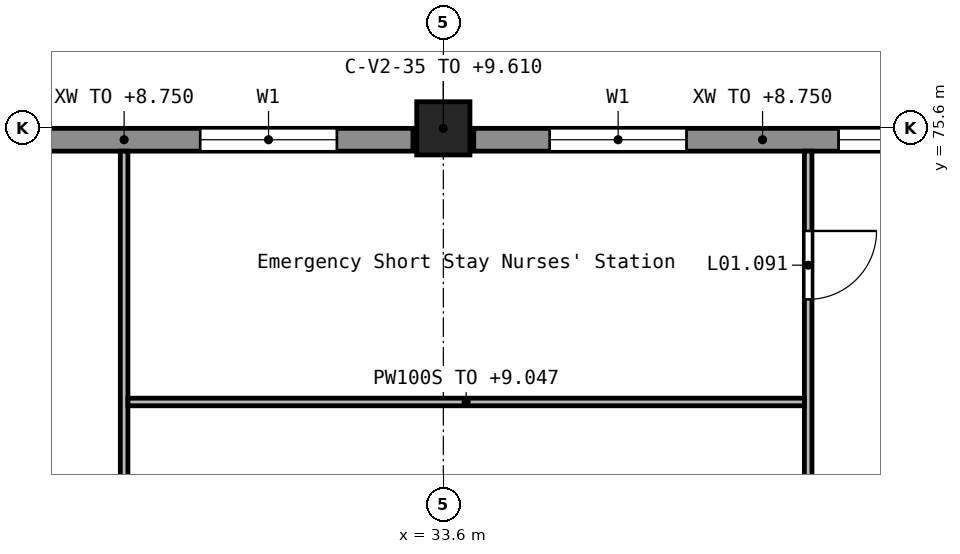
"""IFC4 building model, lengths in metres.
Left out: names, types, materials, properties, quantities, classifications, styles, units other than length and angle.
Written with IfcOpenShell. Run it as: python <this file> out.ifc"""

import sys

from ifc_helpers import new_model, si_unit, direction, frame, frame_2d, origin, origin_2d, place, context, subcontext, project, spatial, rectangle, extrude, element, fill, save


model = new_model("IFC4")
c1 = context("Model", 3, precision=1e-05, world=origin(), true_north=direction((0.0, 1.0)))
c2 = subcontext(c1, "Body", "Model", "MODEL_VIEW")
j1 = project(units=[si_unit("LENGTHUNIT", "METRE"), si_unit("PLANEANGLEUNIT", "RADIAN")], contexts=[c1])
p1 = place(None, origin())
s1 = spatial("IfcSite", under=j1, at=p1, CompositionType="ELEMENT")
p2 = place(p1, origin())
s2 = spatial("IfcBuilding", under=s1, at=p2, CompositionType="ELEMENT")
p3 = place(p2, frame((0.0, 0.0, 5.4)))
s3 = spatial("IfcBuildingStorey", under=s2, at=p3, CompositionType="ELEMENT", Elevation=5.4)
p4 = place(p3, frame((33.6, 75.6, 0.0), z_axis=(0.0, 0.0, 1.0), x_axis=(1.0, 0.0, 0.0)))
e1 = element("IfcColumn", 1, at=p4, inside=s3, PredefinedType="COLUMN", context=c2, shape_type="SweptSolid", body=[
    extrude(rectangle(XDim=0.7, YDim=0.7, at=origin_2d()), origin(), (0.0, 0.0, 1.0), 4.21),
])
p5 = place(p3, frame((41.6, 75.45, 0.0), z_axis=(0.0, 0.0, 1.0), x_axis=(-1.0, 0.0, 0.0)))
e2 = element("IfcWall", 2, at=p5, inside=s3, PredefinedType="STANDARD", context=c2, shape_type="SweptSolid", body=[
    extrude(rectangle(XDim=7.6, YDim=0.3, at=frame_2d((3.8, 0.0))), origin(), (0.0, 0.0, 1.0), 3.35),
])
p6 = place(p5, frame((1.0, 0.0, 0.9)))
e3 = element("IfcOpeningElement", 3, at=p6, cuts=e2, PredefinedType="OPENING", context=c2, shape_type="SweptSolid", body=[
    extrude(rectangle(XDim=1.8, YDim=1.5, at=frame_2d((0.9, 0.75))), frame((0.0, 0.16, 0.0), z_axis=(0.0, -1.0, 0.0), x_axis=(1.0, 0.0, 0.0)), (0.0, 0.0, 1.0), 0.32),
])
p7 = place(p5, frame((4.8, 0.0, 0.9)))
e4 = element("IfcOpeningElement", 4, at=p7, cuts=e2, PredefinedType="OPENING", context=c2, shape_type="SweptSolid", body=[
    extrude(rectangle(XDim=1.8, YDim=1.5, at=frame_2d((0.9, 0.75))), frame((0.0, 0.16, 0.0), z_axis=(0.0, -1.0, 0.0), x_axis=(1.0, 0.0, 0.0)), (0.0, 0.0, 1.0), 0.32),
])
p8 = place(p3, frame((33.2, 75.45, 0.0), z_axis=(0.0, 0.0, 1.0), x_axis=(-1.0, 0.0, 0.0)))
e5 = element("IfcWall", 5, at=p8, inside=s3, PredefinedType="STANDARD", context=c2, shape_type="SweptSolid", body=[
    extrude(rectangle(XDim=7.6, YDim=0.3, at=frame_2d((3.8, 0.0))), origin(), (0.0, 0.0, 1.0), 3.35),
])
p9 = place(p8, frame((1.0, 0.0, 0.9)))
e6 = element("IfcOpeningElement", 6, at=p9, cuts=e5, PredefinedType="OPENING", context=c2, shape_type="SweptSolid", body=[
    extrude(rectangle(XDim=1.8, YDim=1.5, at=frame_2d((0.9, 0.75))), frame((0.0, 0.16, 0.0), z_axis=(0.0, -1.0, 0.0), x_axis=(1.0, 0.0, 0.0)), (0.0, 0.0, 1.0), 0.32),
])
p10 = place(p8, frame((4.8, 0.0, 0.9)))
e7 = element("IfcOpeningElement", 7, at=p10, cuts=e5, PredefinedType="OPENING", context=c2, shape_type="SweptSolid", body=[
    extrude(rectangle(XDim=1.8, YDim=1.5, at=frame_2d((0.9, 0.75))), frame((0.0, 0.16, 0.0), z_axis=(0.0, -1.0, 0.0), x_axis=(1.0, 0.0, 0.0)), (0.0, 0.0, 1.0), 0.32),
])
p11 = place(p3, frame((38.4, 75.3, 0.0), z_axis=(0.0, 0.0, 1.0), x_axis=(0.0, -1.0, 0.0)))
e8 = element("IfcWall", 8, at=p11, inside=s3, PredefinedType="PARTITIONING", context=c2, shape_type="SweptSolid", body=[
    extrude(rectangle(XDim=10.325, YDim=0.1, at=frame_2d((5.163, 0.0))), origin(), (0.0, 0.0, 1.0), 4.15),
])
p12 = place(p11, frame((8.6, 0.0, 0.0)))
e9 = element("IfcOpeningElement", 9, at=p12, cuts=e8, PredefinedType="OPENING", context=c2, shape_type="SweptSolid", body=[
    extrude(rectangle(XDim=1.4, YDim=2.1, at=frame_2d((0.7, 1.05))), frame((0.0, 0.06, 0.0), z_axis=(0.0, -1.0, 0.0), x_axis=(1.0, 0.0, 0.0)), (0.0, 0.0, 1.0), 0.12),
])
p13 = place(p11, frame((5.0, 0.0, 0.0)))
e10 = element("IfcOpeningElement", 10, at=p13, cuts=e8, PredefinedType="OPENING", context=c2, shape_type="SweptSolid", body=[
    extrude(rectangle(XDim=1.4, YDim=2.1, at=frame_2d((0.7, 1.05))), frame((0.0, 0.06, 0.0), z_axis=(0.0, -1.0, 0.0), x_axis=(1.0, 0.0, 0.0)), (0.0, 0.0, 1.0), 0.12),
])
p14 = place(p11, frame((1.05, 0.0, 0.0)))
e11 = element("IfcOpeningElement", 11, at=p14, cuts=e8, PredefinedType="OPENING", context=c2, shape_type="SweptSolid", body=[
    extrude(rectangle(XDim=0.9, YDim=2.1, at=frame_2d((0.45, 1.05))), frame((0.0, 0.06, 0.0), z_axis=(0.0, -1.0, 0.0), x_axis=(1.0, 0.0, 0.0)), (0.0, 0.0, 1.0), 0.12),
])
p15 = place(p3, frame((29.4, 75.3, 0.0), z_axis=(0.0, 0.0, 1.0), x_axis=(0.0, -1.0, 0.0)))
e12 = element("IfcWall", 12, at=p15, inside=s3, PredefinedType="PARTITIONING", context=c2, shape_type="SweptSolid", body=[
    extrude(rectangle(XDim=7.7, YDim=0.1, at=frame_2d((3.85, 0.0))), origin(), (0.0, 0.0, 1.0), 4.15),
])
p16 = place(p3, frame((29.45, 72.0, 0.0), z_axis=(0.0, 0.0, 1.0), x_axis=(1.0, 0.0, 0.0)))
e13 = element("IfcWall", 13, at=p16, inside=s3, PredefinedType="PARTITIONING", context=c2, shape_type="SweptSolid", body=[
    extrude(rectangle(XDim=8.9, YDim=0.1, at=frame_2d((4.45, 0.0))), origin(), (0.0, 0.0, 1.0), 3.647),
])
p17 = place(p6, origin())
e14 = element("IfcWindow", 14, at=p17, inside=s3, PartitioningType="SINGLE_PANEL", PredefinedType="WINDOW", context=c2, shape_type="SweptSolid", body=[
    extrude(rectangle(XDim=1.8, YDim=1.5, at=frame_2d((0.9, 0.75))), frame((0.0, 0.03, 0.0), z_axis=(0.0, -1.0, 0.0), x_axis=(1.0, 0.0, 0.0)), (0.0, 0.0, 1.0), 0.06),
])
fill(e3, e14)
p18 = place(p7, origin())
e15 = element("IfcWindow", 15, at=p18, inside=s3, PartitioningType="SINGLE_PANEL", PredefinedType="WINDOW", context=c2, shape_type="SweptSolid", body=[
    extrude(rectangle(XDim=1.8, YDim=1.5, at=frame_2d((0.9, 0.75))), frame((0.0, 0.03, 0.0), z_axis=(0.0, -1.0, 0.0), x_axis=(1.0, 0.0, 0.0)), (0.0, 0.0, 1.0), 0.06),
])
fill(e4, e15)
p19 = place(p9, origin())
e16 = element("IfcWindow", 16, at=p19, inside=s3, PartitioningType="SINGLE_PANEL", PredefinedType="WINDOW", context=c2, shape_type="SweptSolid", body=[
    extrude(rectangle(XDim=1.8, YDim=1.5, at=frame_2d((0.9, 0.75))), frame((0.0, 0.03, 0.0), z_axis=(0.0, -1.0, 0.0), x_axis=(1.0, 0.0, 0.0)), (0.0, 0.0, 1.0), 0.06),
])
fill(e6, e16)
p20 = place(p14, frame((0.9, 0.0, 0.0), z_axis=(0.0, 0.0, 1.0), x_axis=(-1.0, 0.0, 0.0)))
e17 = element("IfcDoor", 17, at=p20, inside=s3, OperationType="SINGLE_SWING_RIGHT", PredefinedType="DOOR", context=c2, shape_type="SweptSolid", body=[
    extrude(rectangle(XDim=0.9, YDim=2.1, at=frame_2d((0.45, 1.05))), frame((0.0, 0.025, 0.0), z_axis=(0.0, -1.0, 0.0), x_axis=(1.0, 0.0, 0.0)), (0.0, 0.0, 1.0), 0.05),
])
fill(e11, e17)
save(model, sys.argv[1])
